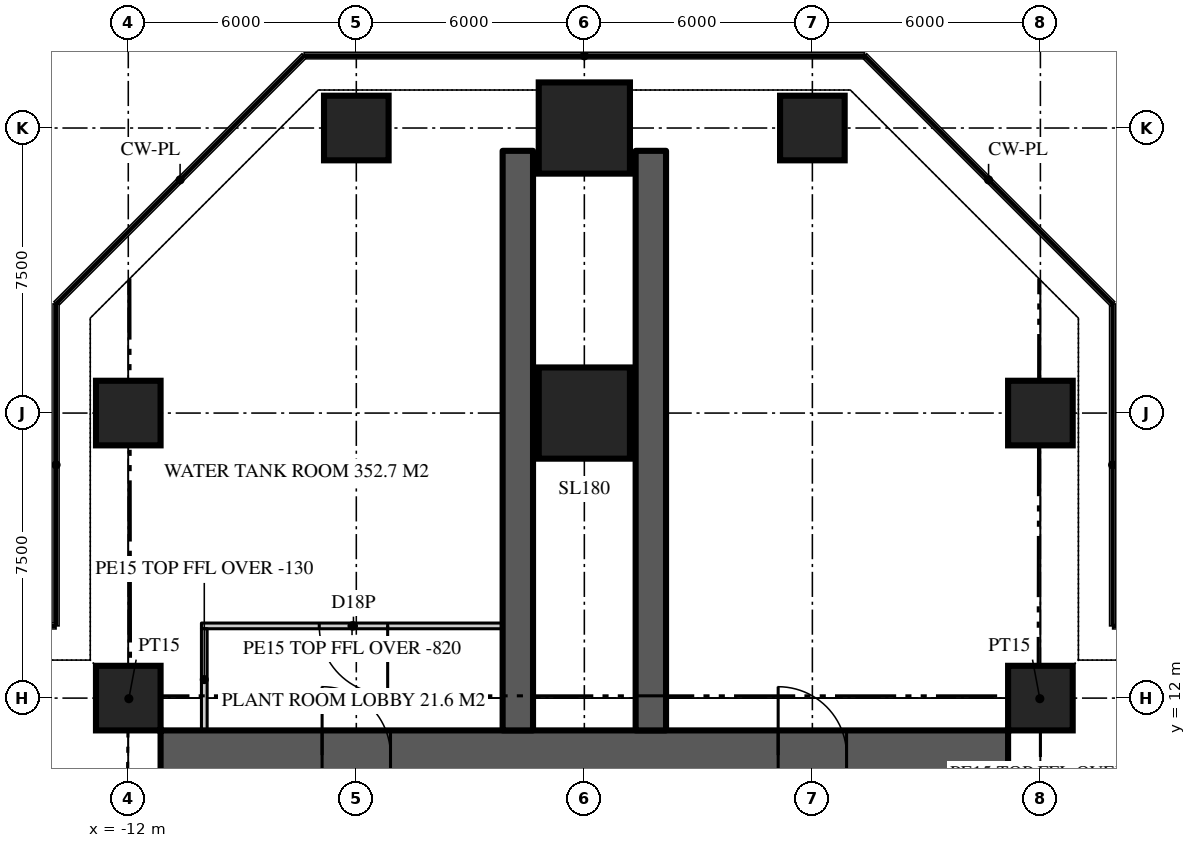
"""IFC4 building model, lengths in metres.
Left out: names, types, materials, properties, quantities, classifications, styles, units other than length and angle.
Written with IfcOpenShell. Run it as: python <this file> out.ifc"""

import sys

from ifc_helpers import new_model, si_unit, direction, frame, frame_2d, origin, origin_2d, place, context, subcontext, project, spatial, rectangle, extrude, element, fill, save


model = new_model("IFC4")
c1 = context("Model", 3, precision=1e-05, world=origin(), true_north=direction((0.0, 1.0)))
c2 = subcontext(c1, "Body", "Model", "MODEL_VIEW")
j1 = project(units=[si_unit("LENGTHUNIT", "METRE"), si_unit("PLANEANGLEUNIT", "RADIAN")], contexts=[c1])
p1 = place(None, origin())
s1 = spatial("IfcSite", under=j1, at=p1, CompositionType="ELEMENT")
p2 = place(p1, origin())
s2 = spatial("IfcBuilding", under=s1, at=p2, CompositionType="ELEMENT")
p3 = place(p2, frame((0.0, 0.0, 198.9)))
s3 = spatial("IfcBuildingStorey", under=s2, at=p3, CompositionType="ELEMENT", Elevation=198.9)
p4 = place(p3, frame((-11.15, 10.5, 0.0), z_axis=(0.0, 0.0, 1.0), x_axis=(1.0, 0.0, 0.0)))
e1 = element("IfcWall", 1, at=p4, inside=s3, PredefinedType="SHEAR", context=c2, shape_type="SweptSolid", body=[
    extrude(rectangle(XDim=22.3, YDim=1.3, at=frame_2d((11.15, 0.0))), origin(), (0.0, 0.0, 1.0), 6.0),
])
p5 = place(p4, frame((4.25, 0.0, 0.0)))
e2 = element("IfcOpeningElement", 2, at=p5, cuts=e1, PredefinedType="OPENING", context=c2, shape_type="SweptSolid", body=[
    extrude(rectangle(XDim=1.8, YDim=2.2, at=frame_2d((0.9, 1.1))), frame((0.0, 0.66, 0.0), z_axis=(0.0, -1.0, 0.0), x_axis=(1.0, 0.0, 0.0)), (0.0, 0.0, 1.0), 1.32),
])
p6 = place(p4, frame((16.25, 0.0, 0.0)))
e3 = element("IfcOpeningElement", 3, at=p6, cuts=e1, PredefinedType="OPENING", context=c2, shape_type="SweptSolid", body=[
    extrude(rectangle(XDim=1.8, YDim=2.2, at=frame_2d((0.9, 1.1))), frame((0.0, 0.66, 0.0), z_axis=(0.0, -1.0, 0.0), x_axis=(1.0, 0.0, 0.0)), (0.0, 0.0, 1.0), 1.32),
])
for number, where, z_axis, x_axis in (
    (4, (1.75, 11.15, 0.0), (0.0, 0.0, 1.0), (0.0, 1.0, 0.0)),
    (5, (-1.75, 11.15, 0.0), (0.0, 0.0, 1.0), (0.0, 1.0, 0.0)),
):
    element("IfcWall", number, at=place(p3, frame(where, z_axis=z_axis, x_axis=x_axis)), inside=s3, PredefinedType="SHEAR", context=c2, shape_type="SweptSolid", body=[
        extrude(rectangle(XDim=15.25, YDim=0.8, at=frame_2d((7.625, 0.0))), origin(), (0.0, 0.0, 1.0), 6.0),
    ])
for number, where, z_axis, x_axis in (
    (6, (-12.0, 12.0, 0.0), (0.0, 0.0, 1.0), (1.0, 0.0, 0.0)),
    (7, (12.0, 12.0, 0.0), (0.0, 0.0, 1.0), (1.0, 0.0, 0.0)),
    (8, (-12.0, 19.5, 0.0), (0.0, 0.0, 1.0), (1.0, 0.0, 0.0)),
):
    element("IfcColumn", number, at=place(p3, frame(where, z_axis=z_axis, x_axis=x_axis)), inside=s3, PredefinedType="COLUMN", context=c2, shape_type="SweptSolid", body=[
        extrude(rectangle(XDim=1.7, YDim=1.7, at=origin_2d()), origin(), (0.0, 0.0, 1.0), 6.0),
    ])
p7 = place(p3, frame((0.0, 19.5, 0.0), z_axis=(0.0, 0.0, 1.0), x_axis=(1.0, 0.0, 0.0)))
e9 = element("IfcColumn", 9, at=p7, inside=s3, PredefinedType="COLUMN", context=c2, shape_type="SweptSolid", body=[
    extrude(rectangle(XDim=2.4, YDim=2.4, at=origin_2d()), origin(), (0.0, 0.0, 1.0), 6.0),
])
for number, where, z_axis, x_axis in (
    (10, (12.0, 19.5, 0.0), (0.0, 0.0, 1.0), (1.0, 0.0, 0.0)),
    (11, (-6.0, 27.0, 0.0), (0.0, 0.0, 1.0), (1.0, 0.0, 0.0)),
):
    element("IfcColumn", number, at=place(p3, frame(where, z_axis=z_axis, x_axis=x_axis)), inside=s3, PredefinedType="COLUMN", context=c2, shape_type="SweptSolid", body=[
        extrude(rectangle(XDim=1.7, YDim=1.7, at=origin_2d()), origin(), (0.0, 0.0, 1.0), 6.0),
    ])
p8 = place(p3, frame((0.0, 27.0, 0.0), z_axis=(0.0, 0.0, 1.0), x_axis=(1.0, 0.0, 0.0)))
e12 = element("IfcColumn", 12, at=p8, inside=s3, PredefinedType="COLUMN", context=c2, shape_type="SweptSolid", body=[
    extrude(rectangle(XDim=2.4, YDim=2.4, at=origin_2d()), origin(), (0.0, 0.0, 1.0), 6.0),
])
p9 = place(p3, frame((6.0, 27.0, 0.0), z_axis=(0.0, 0.0, 1.0), x_axis=(1.0, 0.0, 0.0)))
e13 = element("IfcColumn", 13, at=p9, inside=s3, PredefinedType="COLUMN", context=c2, shape_type="SweptSolid", body=[
    extrude(rectangle(XDim=1.7, YDim=1.7, at=origin_2d()), origin(), (0.0, 0.0, 1.0), 6.0),
])
p10 = place(p3, frame((-2.15, 13.9, 0.0), z_axis=(0.0, 0.0, 1.0), x_axis=(-1.0, 0.0, 0.0)))
e14 = element("IfcWall", 14, at=p10, inside=s3, PredefinedType="SOLIDWALL", context=c2, shape_type="SweptSolid", body=[
    extrude(rectangle(XDim=7.925, YDim=0.15, at=frame_2d((3.962, 0.0))), origin(), (0.0, 0.0, 1.0), 5.18),
])
p11 = place(p10, frame((3.025, 0.0, 0.0)))
e15 = element("IfcOpeningElement", 15, at=p11, cuts=e14, PredefinedType="OPENING", context=c2, shape_type="SweptSolid", body=[
    extrude(rectangle(XDim=1.8, YDim=2.4, at=frame_2d((0.9, 1.2))), frame((0.0, 0.085, 0.0), z_axis=(0.0, -1.0, 0.0), x_axis=(1.0, 0.0, 0.0)), (0.0, 0.0, 1.0), 0.17),
])
p12 = place(p3, frame((-10.0, 11.15, 0.0), z_axis=(0.0, 0.0, 1.0), x_axis=(0.0, 1.0, 0.0)))
e16 = element("IfcWall", 16, at=p12, inside=s3, PredefinedType="SOLIDWALL", context=c2, shape_type="SweptSolid", body=[
    extrude(rectangle(XDim=2.675, YDim=0.15, at=frame_2d((1.337, 0.0))), origin(), (0.0, 0.0, 1.0), 5.87),
])
for number, where, z_axis, x_axis in (
    (17, (11.15, 11.15, 0.0), (0.0, 0.0, 1.0), (0.707, 0.707, 0.0)),
    (18, (-11.15, 11.15, 0.0), (0.0, 0.0, 1.0), (-0.707, 0.707, 0.0)),
):
    element("IfcWall", number, at=place(p3, frame(where, z_axis=z_axis, x_axis=x_axis)), inside=s3, PredefinedType="PARTITIONING", context=c2, shape_type="SweptSolid", body=[
        extrude(rectangle(XDim=2.362, YDim=0.15, at=frame_2d((1.181, 0.0))), origin(), (0.0, 0.0, 1.0), 5.32),
    ])
p13 = place(p5, origin())
e19 = element("IfcDoor", 19, at=p13, inside=s3, OperationType="DOUBLE_DOOR_DOUBLE_SWING", PredefinedType="DOOR", context=c2, shape_type="SweptSolid", body=[
    extrude(rectangle(XDim=1.8, YDim=2.2, at=frame_2d((0.9, 1.1))), frame((0.0, 0.025, 0.0), z_axis=(0.0, -1.0, 0.0), x_axis=(1.0, 0.0, 0.0)), (0.0, 0.0, 1.0), 0.05),
])
fill(e2, e19)
p14 = place(p6, origin())
e20 = element("IfcDoor", 20, at=p14, inside=s3, OperationType="DOUBLE_DOOR_DOUBLE_SWING", PredefinedType="DOOR", context=c2, shape_type="SweptSolid", body=[
    extrude(rectangle(XDim=1.8, YDim=2.2, at=frame_2d((0.9, 1.1))), frame((0.0, 0.025, 0.0), z_axis=(0.0, -1.0, 0.0), x_axis=(1.0, 0.0, 0.0)), (0.0, 0.0, 1.0), 0.05),
])
fill(e3, e20)
p15 = place(p11, origin())
e21 = element("IfcDoor", 21, at=p15, inside=s3, OperationType="DOUBLE_DOOR_DOUBLE_SWING", PredefinedType="DOOR", context=c2, shape_type="SweptSolid", body=[
    extrude(rectangle(XDim=1.8, YDim=2.4, at=frame_2d((0.9, 1.2))), frame((0.0, 0.025, 0.0), z_axis=(0.0, -1.0, 0.0), x_axis=(1.0, 0.0, 0.0)), (0.0, 0.0, 1.0), 0.05),
])
fill(e15, e21)
save(model, sys.argv[1])
